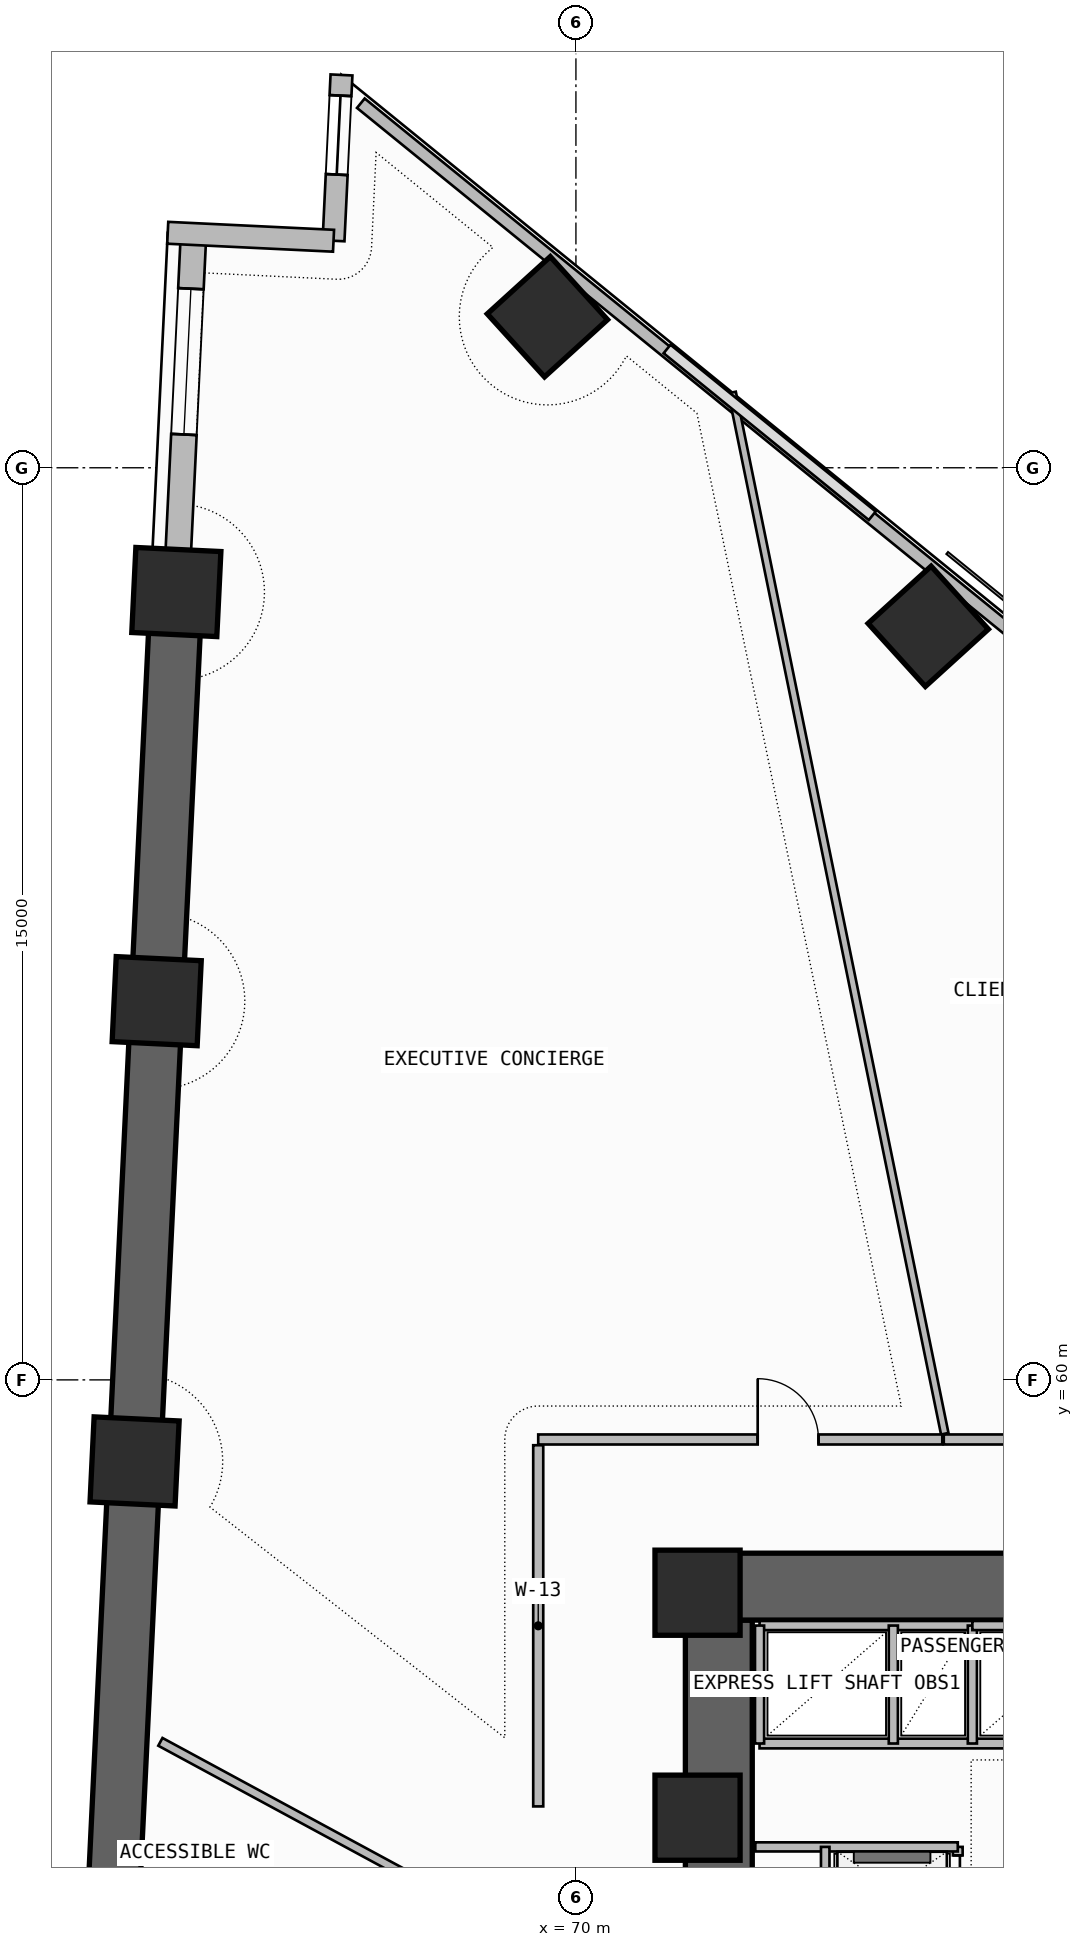
"""IFC4 building model, lengths in metres.
Left out: names, types, materials, properties, quantities, classifications, styles, units other than length and angle.
Written with IfcOpenShell. Run it as: python <this file> out.ifc"""

import sys

from ifc_helpers import new_model, si_unit, direction, frame, frame_2d, origin, origin_2d, place, context, subcontext, project, spatial, rectangle, extrude, element, fill, save


model = new_model("IFC4")
c1 = context("Model", 3, precision=1e-05, world=origin(), true_north=direction((0.0, 1.0)))
c2 = subcontext(c1, "Body", "Model", "MODEL_VIEW")
j1 = project(units=[si_unit("LENGTHUNIT", "METRE"), si_unit("PLANEANGLEUNIT", "RADIAN")], contexts=[c1])
p1 = place(None, origin())
s1 = spatial("IfcSite", under=j1, at=p1, CompositionType="ELEMENT")
p2 = place(p1, origin())
s2 = spatial("IfcBuilding", under=s1, at=p2, CompositionType="ELEMENT")
p3 = place(p2, frame((0.0, 0.0, 41.1)))
s3 = spatial("IfcBuildingStorey", under=s2, at=p3, CompositionType="ELEMENT", Elevation=41.1)
p4 = place(p3, frame((72.35, 43.35, -0.2), z_axis=(0.0, 0.0, 1.0), x_axis=(0.0, 1.0, 0.0)))
e1 = element("IfcWall", 1, at=p4, inside=s3, PredefinedType="SHEAR", context=c2, shape_type="SweptSolid", body=[
    extrude(rectangle(XDim=12.7, YDim=1.1, at=frame_2d((6.35, 0.0))), origin(), (0.0, 0.0, 1.0), 3.6),
])
p5 = place(p4, frame((1.35, 0.0, 0.2)))
e2 = element("IfcOpeningElement", 2, at=p5, cuts=e1, PredefinedType="OPENING", context=c2, shape_type="SweptSolid", body=[
    extrude(rectangle(XDim=1.2, YDim=2.2, at=frame_2d((0.6, 1.1))), frame((0.0, 0.56, 0.0), z_axis=(0.0, -1.0, 0.0), x_axis=(1.0, 0.0, 0.0)), (0.0, 0.0, 1.0), 1.12),
])
p6 = place(p3, frame((71.8, 56.6, -0.2), z_axis=(0.0, 0.0, 1.0), x_axis=(1.0, 0.0, 0.0)))
e3 = element("IfcWall", 3, at=p6, inside=s3, PredefinedType="SHEAR", context=c2, shape_type="SweptSolid", body=[
    extrude(rectangle(XDim=14.3, YDim=1.1, at=frame_2d((7.15, 0.0))), origin(), (0.0, 0.0, 1.0), 3.6),
])
for number, where, z_axis, x_axis in (
    (4, (72.0, 52.8, 0.0), (0.0, 0.0, 1.0), (1.0, 0.0, 0.0)),
    (5, (72.0, 56.5, 0.0), (0.0, 0.0, 1.0), (1.0, 0.0, 0.0)),
    (6, (75.794, 72.392, 0.0), (0.0, 0.0, 1.0), (0.74, 0.672, 0.0)),
    (7, (69.531, 77.483, 0.0), (0.0, 0.0, 1.0), (0.74, 0.672, 0.0)),
    (8, (63.428, 72.957, 0.0), (0.0, 0.0, 1.0), (0.048, 0.999, 0.0)),
    (9, (63.105, 66.228, 0.0), (0.0, 0.0, 1.0), (0.048, 0.999, 0.0)),
    (10, (62.742, 58.659, 0.0), (0.0, 0.0, 1.0), (0.048, 0.999, 0.0)),
):
    element("IfcColumn", number, at=place(p3, frame(where, z_axis=z_axis, x_axis=x_axis)), inside=s3, PredefinedType="COLUMN", context=c2, shape_type="SweptSolid", body=[
        extrude(rectangle(XDim=1.4, YDim=1.4, at=origin_2d()), origin(), (0.0, 0.0, 1.0), 3.6),
    ])
p7 = place(p3, frame((63.711, 78.844, 0.0), z_axis=(0.0, 0.0, 1.0), x_axis=(-0.048007946398, -0.998846953784, 0.0)))
e11 = element("IfcWall", 11, at=p7, inside=s3, PredefinedType="SOLIDWALL", context=c2, shape_type="SweptSolid", body=[
    extrude(rectangle(XDim=5.894, YDim=0.42, at=frame_2d((2.947, 0.0))), origin(), (0.0, 0.0, 1.0), 2.385),
])
p8 = place(p7, frame((0.9, 0.0, 1.2)))
e12 = element("IfcOpeningElement", 12, at=p8, cuts=e11, PredefinedType="OPENING", context=c2, shape_type="SweptSolid", body=[
    extrude(rectangle(XDim=2.4, YDim=0.9, at=frame_2d((1.2, 0.45))), frame((0.0, 0.22, 0.0), z_axis=(0.0, -1.0, 0.0), x_axis=(1.0, 0.0, 0.0)), (0.0, 0.0, 1.0), 0.44),
])
p9 = place(p3, frame((63.428, 72.957, -0.2), z_axis=(0.0, 0.0, 1.0), x_axis=(-0.047976309476, -0.998848473858, 0.0)))
e13 = element("IfcWall", 13, at=p9, inside=s3, PredefinedType="SHEAR", context=c2, shape_type="SweptSolid", body=[
    extrude(rectangle(XDim=21.892, YDim=0.85, at=frame_2d((10.946, 0.0))), origin(), (0.0, 0.0, 1.0), 3.6),
])
p10 = place(p3, frame((66.144, 81.46, 0.0), z_axis=(0.0, 0.0, 1.0), x_axis=(-0.047934806162, -0.998850466465, 0.0)))
e14 = element("IfcWall", 14, at=p10, inside=s3, PredefinedType="SOLIDWALL", context=c2, shape_type="SweptSolid", body=[
    extrude(rectangle(XDim=2.73, YDim=0.36, at=frame_2d((1.365, 0.0))), origin(), (0.0, 0.0, 1.0), 3.4),
])
p11 = place(p10, frame((0.34, 0.0, 0.45)))
e15 = element("IfcOpeningElement", 15, at=p11, cuts=e14, PredefinedType="OPENING", context=c2, shape_type="SweptSolid", body=[
    extrude(rectangle(XDim=1.3, YDim=2.4, at=frame_2d((0.65, 1.2))), frame((0.0, 0.19, 0.0), z_axis=(0.0, -1.0, 0.0), x_axis=(1.0, 0.0, 0.0)), (0.0, 0.0, 1.0), 0.38),
])
p12 = place(p3, frame((66.013, 78.733, 0.0), z_axis=(0.0, 0.0, 1.0), x_axis=(-0.998846180588, 0.048024030708, 0.0)))
e16 = element("IfcWall", 16, at=p12, inside=s3, PredefinedType="SOLIDWALL", context=c2, shape_type="SweptSolid", body=[
    extrude(rectangle(XDim=2.73, YDim=0.36, at=frame_2d((1.365, 0.0))), origin(), (0.0, 0.0, 1.0), 3.4),
])
p13 = place(p3, frame((94.513, 58.196, 0.0), z_axis=(0.0, 0.0, 1.0), x_axis=(-0.776001602097, 0.630730935933, 0.0)))
e17 = element("IfcWall", 17, at=p13, inside=s3, PredefinedType="PARAPET", context=c2, shape_type="SweptSolid", body=[
    extrude(rectangle(XDim=36.148, YDim=0.2, at=frame_2d((18.074, 0.0))), origin(), (0.0, 0.0, 1.0), 1.15),
])
p14 = place(p3, frame((76.28, 47.18, 0.0), z_axis=(0.0, 0.0, 1.0), x_axis=(0.0, 1.0, 0.0)))
e18 = element("IfcWall", 18, at=p14, inside=s3, PredefinedType="SOLIDWALL", context=c2, shape_type="SweptSolid", body=[
    extrude(rectangle(XDim=5.14, YDim=0.16, at=frame_2d((2.57, 0.0))), origin(), (0.0, 0.0, 1.0), 3.4),
])
p15 = place(p14, frame((1.1, 0.0, 0.0)))
e19 = element("IfcOpeningElement", 19, at=p15, cuts=e18, PredefinedType="OPENING", context=c2, shape_type="SweptSolid", body=[
    extrude(rectangle(XDim=1.1, YDim=2.25, at=frame_2d((0.55, 1.125))), frame((0.0, 0.09, 0.0), z_axis=(0.0, -1.0, 0.0), x_axis=(1.0, 0.0, 0.0)), (0.0, 0.0, 1.0), 0.18),
])
p16 = place(p14, frame((2.5, 0.0, 0.0)))
e20 = element("IfcOpeningElement", 20, at=p16, cuts=e18, PredefinedType="OPENING", context=c2, shape_type="SweptSolid", body=[
    extrude(rectangle(XDim=1.1, YDim=2.25, at=frame_2d((0.55, 1.125))), frame((0.0, 0.09, 0.0), z_axis=(0.0, -1.0, 0.0), x_axis=(1.0, 0.0, 0.0)), (0.0, 0.0, 1.0), 0.18),
])
p17 = place(p14, frame((3.9, 0.0, 0.0)))
e21 = element("IfcOpeningElement", 21, at=p17, cuts=e18, PredefinedType="OPENING", context=c2, shape_type="SweptSolid", body=[
    extrude(rectangle(XDim=1.1, YDim=2.25, at=frame_2d((0.55, 1.125))), frame((0.0, 0.09, 0.0), z_axis=(0.0, -1.0, 0.0), x_axis=(1.0, 0.0, 0.0)), (0.0, 0.0, 1.0), 0.18),
])
p18 = place(p14, frame((0.12, 0.0, 0.0)))
e22 = element("IfcOpeningElement", 22, at=p18, cuts=e18, PredefinedType="OPENING", context=c2, shape_type="SweptSolid", body=[
    extrude(rectangle(XDim=0.85, YDim=2.05, at=frame_2d((0.425, 1.025))), frame((0.0, 0.09, 0.0), z_axis=(0.0, -1.0, 0.0), x_axis=(1.0, 0.0, 0.0)), (0.0, 0.0, 1.0), 0.18),
])
p19 = place(p3, frame((72.95, 52.32, 0.0), z_axis=(0.0, 0.0, 1.0), x_axis=(1.0, 0.0, 0.0)))
e23 = element("IfcWall", 23, at=p19, inside=s3, PredefinedType="SOLIDWALL", context=c2, shape_type="SweptSolid", body=[
    extrude(rectangle(XDim=3.33, YDim=0.15, at=frame_2d((1.665, 0.0))), origin(), (0.0, 0.0, 1.0), 3.4),
])
p20 = place(p3, frame((74.1, 48.16, 0.0), z_axis=(0.0, 0.0, 1.0), x_axis=(0.0, 1.0, 0.0)))
e24 = element("IfcWall", 24, at=p20, inside=s3, PredefinedType="PLUMBINGWALL", context=c2, shape_type="SweptSolid", body=[
    extrude(rectangle(XDim=4.16, YDim=0.14, at=frame_2d((2.08, 0.0))), origin(), (0.0, 0.0, 1.0), 3.4),
])
p21 = place(p3, frame((73.02, 54.02, 0.0), z_axis=(0.0, 0.0, 1.0), x_axis=(1.0, 0.0, 0.0)))
e25 = element("IfcWall", 25, at=p21, inside=s3, PredefinedType="SOLIDWALL", context=c2, shape_type="SweptSolid", body=[
    extrude(rectangle(XDim=12.08, YDim=0.16, at=frame_2d((6.04, 0.0))), origin(), (0.0, 0.0, 1.0), 3.4),
])
p22 = place(p3, frame((73.02, 55.96, 0.0), z_axis=(0.0, 0.0, 1.0), x_axis=(1.0, 0.0, 0.0)))
e26 = element("IfcWall", 26, at=p22, inside=s3, PredefinedType="SOLIDWALL", context=c2, shape_type="SweptSolid", body=[
    extrude(rectangle(XDim=3.5, YDim=0.15, at=frame_2d((1.75, 0.0))), origin(), (0.0, 0.0, 1.0), 3.4),
])
p23 = place(p3, frame((73.02, 54.02, 0.0), z_axis=(0.0, 0.0, 1.0), x_axis=(0.0, 1.0, 0.0)))
e27 = element("IfcWall", 27, at=p23, inside=s3, PredefinedType="PLUMBINGWALL", context=c2, shape_type="SweptSolid", body=[
    extrude(rectangle(XDim=1.94, YDim=0.15, at=frame_2d((0.97, 0.0))), origin(), (0.0, 0.0, 1.0), 3.4),
])
p24 = place(p3, frame((76.52, 54.02, 0.0), z_axis=(0.0, 0.0, 1.0), x_axis=(0.0, 1.0, 0.0)))
e28 = element("IfcWall", 28, at=p24, inside=s3, PredefinedType="SOLIDWALL", context=c2, shape_type="SweptSolid", body=[
    extrude(rectangle(XDim=1.94, YDim=0.15, at=frame_2d((0.97, 0.0))), origin(), (0.0, 0.0, 1.0), 3.4),
])
p25 = place(p3, frame((75.22, 54.02, 0.0), z_axis=(0.0, 0.0, 1.0), x_axis=(0.0, 1.0, 0.0)))
e29 = element("IfcWall", 29, at=p25, inside=s3, PredefinedType="PLUMBINGWALL", context=c2, shape_type="SweptSolid", body=[
    extrude(rectangle(XDim=1.94, YDim=0.15, at=frame_2d((0.97, 0.0))), origin(), (0.0, 0.0, 1.0), 3.4),
])
p26 = place(p3, frame((76.52, 55.96, 0.0), z_axis=(0.0, 0.0, 1.0), x_axis=(1.0, 0.0, 0.0)))
e30 = element("IfcWall", 30, at=p26, inside=s3, PredefinedType="SOLIDWALL", context=c2, shape_type="SweptSolid", body=[
    extrude(rectangle(XDim=6.7, YDim=0.15, at=frame_2d((3.35, 0.0))), origin(), (0.0, 0.0, 1.0), 3.4),
])
p27 = place(p3, frame((81.081, 59.02, 0.0), z_axis=(0.0, 0.0, 1.0), x_axis=(-1.0, 0.0, 0.0)))
e31 = element("IfcWall", 31, at=p27, inside=s3, PredefinedType="PARTITIONING", context=c2, shape_type="SweptSolid", body=[
    extrude(rectangle(XDim=5.031, YDim=0.165, at=frame_2d((2.516, 0.0))), origin(), (0.0, 0.0, 1.0), 3.4),
])
p28 = place(p27, frame((2.015, 0.0, 0.0)))
e32 = element("IfcOpeningElement", 32, at=p28, cuts=e31, PredefinedType="OPENING", context=c2, shape_type="SweptSolid", body=[
    extrude(rectangle(XDim=1.0, YDim=2.2, at=frame_2d((0.5, 1.1))), frame((0.0, 0.093, 0.0), z_axis=(0.0, -1.0, 0.0), x_axis=(1.0, 0.0, 0.0)), (0.0, 0.0, 1.0), 0.185),
])
p29 = place(p3, frame((76.066, 59.115, 0.0), z_axis=(0.0, 0.0, 1.0), x_axis=(-0.200103691779, 0.979774725402, 0.0)))
e33 = element("IfcWall", 33, at=p29, inside=s3, PredefinedType="PARTITIONING", context=c2, shape_type="SweptSolid", body=[
    extrude(rectangle(XDim=17.478, YDim=0.125, at=frame_2d((8.739, 0.0))), origin(), (0.0, 0.0, 1.0), 2.785),
])
p30 = place(p3, frame((76.025, 59.02, 0.0), z_axis=(0.0, 0.0, 1.0), x_axis=(-1.0, 0.0, 0.0)))
e34 = element("IfcWall", 34, at=p30, inside=s3, PredefinedType="PARTITIONING", context=c2, shape_type="SweptSolid", body=[
    extrude(rectangle(XDim=6.646, YDim=0.165, at=frame_2d((3.323, 0.0))), origin(), (0.0, 0.0, 1.0), 2.785),
])
p31 = place(p30, frame((2.036, 0.0, 0.0)))
e35 = element("IfcOpeningElement", 35, at=p31, cuts=e34, PredefinedType="OPENING", context=c2, shape_type="SweptSolid", body=[
    extrude(rectangle(XDim=1.0, YDim=2.2, at=frame_2d((0.5, 1.1))), frame((0.0, 0.093, 0.0), z_axis=(0.0, -1.0, 0.0), x_axis=(1.0, 0.0, 0.0)), (0.0, 0.0, 1.0), 0.185),
])
p32 = place(p3, frame((69.38, 58.926, 0.0), z_axis=(0.0, 0.0, 1.0), x_axis=(0.0, -1.0, 0.0)))
e36 = element("IfcWall", 36, at=p32, inside=s3, PredefinedType="PARTITIONING", context=c2, shape_type="SweptSolid", body=[
    extrude(rectangle(XDim=5.94, YDim=0.165, at=frame_2d((2.97, 0.0))), origin(), (0.0, 0.0, 1.0), 2.785),
])
p33 = place(p3, frame((63.166, 54.048, 0.0), z_axis=(0.0, 0.0, 1.0), x_axis=(0.879472106789, -0.475950431641, 0.0)))
e37 = element("IfcWall", 37, at=p33, inside=s3, PredefinedType="PARTITIONING", context=c2, shape_type="SweptSolid", body=[
    extrude(rectangle(XDim=6.998, YDim=0.145, at=frame_2d((3.499, 0.0))), origin(), (0.0, 0.0, 1.0), 2.785),
])
p34 = place(p8, origin())
e38 = element("IfcWindow", 38, at=p34, inside=s3, PartitioningType="SINGLE_PANEL", PredefinedType="WINDOW", context=c2, shape_type="SweptSolid", body=[
    extrude(rectangle(XDim=2.4, YDim=0.9, at=frame_2d((1.2, 0.45))), frame((0.0, 0.03, 0.0), z_axis=(0.0, -1.0, 0.0), x_axis=(1.0, 0.0, 0.0)), (0.0, 0.0, 1.0), 0.06),
])
fill(e12, e38)
p35 = place(p11, origin())
e39 = element("IfcWindow", 39, at=p35, inside=s3, PartitioningType="SINGLE_PANEL", PredefinedType="WINDOW", context=c2, shape_type="SweptSolid", body=[
    extrude(rectangle(XDim=1.3, YDim=2.4, at=frame_2d((0.65, 1.2))), frame((0.0, 0.03, 0.0), z_axis=(0.0, -1.0, 0.0), x_axis=(1.0, 0.0, 0.0)), (0.0, 0.0, 1.0), 0.06),
])
fill(e15, e39)
p36 = place(p17, origin())
e40 = element("IfcDoor", 40, at=p36, inside=s3, OperationType="DOUBLE_DOOR_SLIDING", PredefinedType="DOOR", context=c2, shape_type="SweptSolid", body=[
    extrude(rectangle(XDim=1.1, YDim=2.25, at=frame_2d((0.55, 1.125))), frame((0.0, 0.025, 0.0), z_axis=(0.0, -1.0, 0.0), x_axis=(1.0, 0.0, 0.0)), (0.0, 0.0, 1.0), 0.05),
])
fill(e21, e40)
p37 = place(p31, frame((1.0, 0.0, 0.0), z_axis=(0.0, 0.0, 1.0), x_axis=(-1.0, 0.0, 0.0)))
e41 = element("IfcDoor", 41, at=p37, inside=s3, OperationType="SINGLE_SWING_LEFT", PredefinedType="DOOR", context=c2, shape_type="SweptSolid", body=[
    extrude(rectangle(XDim=1.0, YDim=2.2, at=frame_2d((0.5, 1.1))), frame((0.0, 0.025, 0.0), z_axis=(0.0, -1.0, 0.0), x_axis=(1.0, 0.0, 0.0)), (0.0, 0.0, 1.0), 0.05),
])
fill(e35, e41)
save(model, sys.argv[1])
